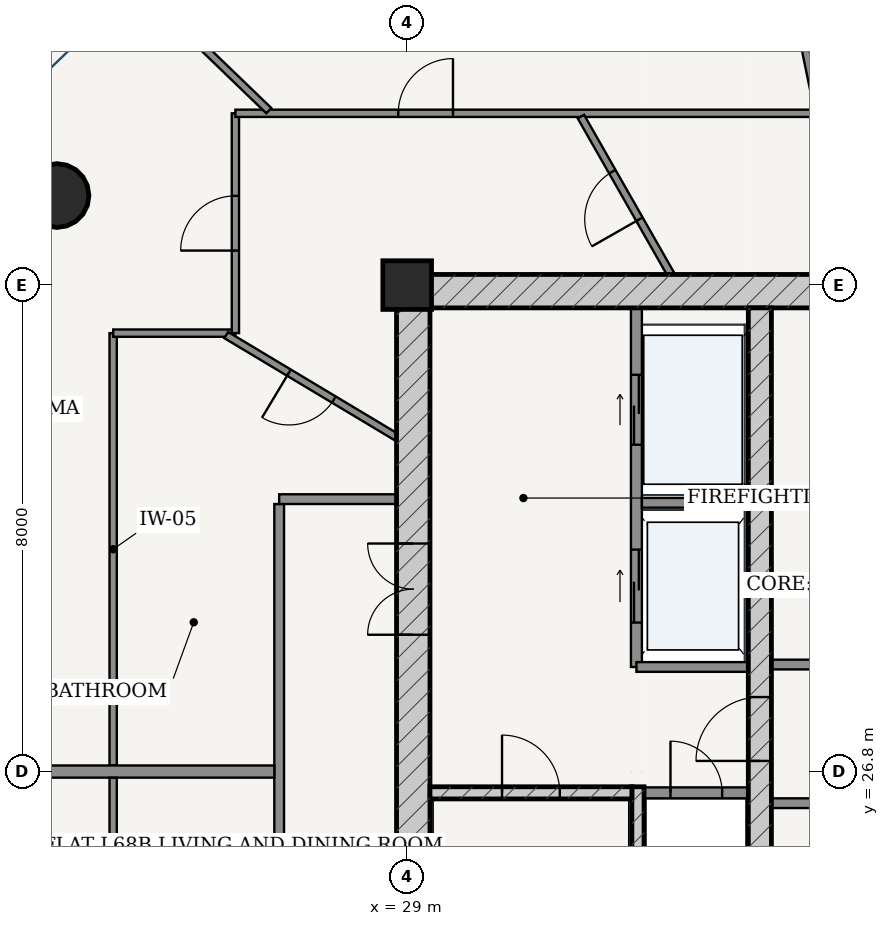
"""IFC4 building model, lengths in metres.
Left out: names, types, materials, properties, quantities, classifications, styles, units other than length and angle.
Written with IfcOpenShell. Run it as: python <this file> out.ifc"""

import sys

from ifc_helpers import new_model, si_unit, direction, frame, frame_2d, origin, origin_2d, place, context, subcontext, project, spatial, rectangle, hollow_circle, extrude, source, transform, mapped, element, fill, save


model = new_model("IFC4")
c1 = context("Model", 3, precision=1e-05, world=origin(), true_north=direction((-0.2419218956, 0.970295726276)))
c2 = subcontext(c1, "Body", "Model", "MODEL_VIEW")
j1 = project(units=[si_unit("LENGTHUNIT", "METRE"), si_unit("PLANEANGLEUNIT", "RADIAN")], contexts=[c1])
p1 = place(None, origin())
s1 = spatial("IfcSite", under=j1, at=p1, CompositionType="ELEMENT")
p2 = place(p1, origin())
s2 = spatial("IfcBuilding", under=s1, at=p2, CompositionType="ELEMENT")
p3 = place(p2, frame((0.0, 0.0, 259.45)))
s3 = spatial("IfcBuildingStorey", under=s2, at=p3, CompositionType="ELEMENT", Elevation=259.45)
p4 = place(p3, frame((29.0, 34.8, 0.0), z_axis=(0.0, 0.0, 1.0), x_axis=(1.0, 0.0, 0.0)))
e1 = element("IfcColumn", 1, at=p4, inside=s3, PredefinedType="COLUMN", context=c2, shape_type="SweptSolid", body=[
    extrude(rectangle(XDim=0.8, YDim=0.8, at=origin_2d()), origin(), (0.0, 0.0, 1.0), 3.75),
])
p5 = place(p3, frame((28.825, 34.7, 0.0), z_axis=(0.0, 0.0, 1.0), x_axis=(1.0, 0.0, 0.0)))
e2 = element("IfcWall", 2, at=p5, inside=s3, PredefinedType="SHEAR", context=c2, shape_type="SweptSolid", body=[
    extrude(rectangle(XDim=18.35, YDim=0.55, at=frame_2d((9.175, 0.0))), origin(), (0.0, 0.0, 1.0), 3.49),
])
p6 = place(p3, frame((29.1, 19.175, 0.0), z_axis=(0.0, 0.0, 1.0), x_axis=(0.0, 1.0, 0.0)))
e3 = element("IfcWall", 3, at=p6, inside=s3, PredefinedType="SHEAR", context=c2, shape_type="SweptSolid", body=[
    extrude(rectangle(XDim=15.25, YDim=0.55, at=frame_2d((7.625, 0.0))), origin(), (0.0, 0.0, 1.0), 3.49),
])
p7 = place(p6, frame((9.875, 0.0, 0.0)))
e4 = element("IfcOpeningElement", 4, at=p7, cuts=e3, PredefinedType="OPENING", context=c2, shape_type="SweptSolid", body=[
    extrude(rectangle(XDim=1.5, YDim=2.2, at=frame_2d((0.75, 1.1))), frame((0.0, 0.285, 0.0), z_axis=(0.0, -1.0, 0.0), x_axis=(1.0, 0.0, 0.0)), (0.0, 0.0, 1.0), 0.57),
])
p8 = place(p3, frame((32.795, 19.175, 0.0), z_axis=(0.0, 0.0, 1.0), x_axis=(0.0, 1.0, 0.0)))
e5 = element("IfcWall", 5, at=p8, inside=s3, PredefinedType="SOLIDWALL", context=c2, shape_type="SweptSolid", body=[
    extrude(rectangle(XDim=7.375, YDim=0.2, at=frame_2d((3.688, 0.0))), origin(), (0.0, 0.0, 1.0), 3.49),
])
p9 = place(p3, frame((29.375, 26.45, 0.0), z_axis=(0.0, 0.0, 1.0), x_axis=(1.0, 0.0, 0.0)))
e6 = element("IfcWall", 6, at=p9, inside=s3, PredefinedType="SOLIDWALL", context=c2, shape_type="SweptSolid", body=[
    extrude(rectangle(XDim=3.32, YDim=0.2, at=frame_2d((1.66, 0.0))), origin(), (0.0, 0.0, 1.0), 3.49),
])
p10 = place(p9, frame((1.185, 0.0, 0.0)))
e7 = element("IfcOpeningElement", 7, at=p10, cuts=e6, PredefinedType="OPENING", context=c2, shape_type="SweptSolid", body=[
    extrude(rectangle(XDim=0.95, YDim=2.15, at=frame_2d((0.475, 1.075))), frame((0.0, 0.11, 0.0), z_axis=(0.0, -1.0, 0.0), x_axis=(1.0, 0.0, 0.0)), (0.0, 0.0, 1.0), 0.22),
])
p11 = place(p3, frame((34.8, 19.175, 0.0), z_axis=(0.0, 0.0, 1.0), x_axis=(0.0, 1.0, 0.0)))
e8 = element("IfcWall", 8, at=p11, inside=s3, PredefinedType="SHEAR", context=c2, shape_type="SweptSolid", body=[
    extrude(rectangle(XDim=15.25, YDim=0.38, at=frame_2d((7.625, 0.0))), origin(), (0.0, 0.0, 1.0), 3.49),
])
p12 = place(p11, frame((7.8, 0.0, 0.0)))
e9 = element("IfcOpeningElement", 9, at=p12, cuts=e8, PredefinedType="OPENING", context=c2, shape_type="SweptSolid", body=[
    extrude(rectangle(XDim=1.05, YDim=2.15, at=frame_2d((0.525, 1.075))), frame((0.0, 0.2, 0.0), z_axis=(0.0, -1.0, 0.0), x_axis=(1.0, 0.0, 0.0)), (0.0, 0.0, 1.0), 0.4),
])
p13 = place(p3, frame((23.241, 36.272, 0.0), z_axis=(0.0, 0.0, 1.0), x_axis=(1.0, 0.0, 0.0)))
e10 = element("IfcColumn", 10, at=p13, inside=s3, PredefinedType="COLUMN", context=c2, shape_type="SweptSolid", body=[
    extrude(hollow_circle(Radius=0.525, WallThickness=0.035, at=origin_2d()), origin(), (0.0, 0.0, 1.0), 3.75),
])
p14 = place(p3, frame((32.9, 26.45, 0.0), z_axis=(0.0, 0.0, 1.0), x_axis=(1.0, 0.0, 0.0)))
e11 = element("IfcWall", 11, at=p14, inside=s3, PredefinedType="PARTITIONING", context=c2, shape_type="SweptSolid", body=[
    extrude(rectangle(XDim=1.71, YDim=0.18, at=frame_2d((0.855, 0.0))), origin(), (0.0, 0.0, 1.0), 3.49),
])
p15 = place(p14, frame((0.43, 0.0, 0.0)))
e12 = element("IfcOpeningElement", 12, at=p15, cuts=e11, PredefinedType="OPENING", context=c2, shape_type="SweptSolid", body=[
    extrude(rectangle(XDim=0.85, YDim=2.1, at=frame_2d((0.425, 1.05))), frame((0.0, 0.1, 0.0), z_axis=(0.0, -1.0, 0.0), x_axis=(1.0, 0.0, 0.0)), (0.0, 0.0, 1.0), 0.2),
])
p16 = place(p3, frame((32.77, 28.52, 0.0), z_axis=(0.0, 0.0, 1.0), x_axis=(0.0, 1.0, 0.0)))
e13 = element("IfcWall", 13, at=p16, inside=s3, PredefinedType="PARTITIONING", context=c2, shape_type="SweptSolid", body=[
    extrude(rectangle(XDim=5.905, YDim=0.18, at=frame_2d((2.953, 0.0))), origin(), (0.0, 0.0, 1.0), 3.49),
])
p17 = place(p16, frame((3.655, 0.0, 0.0)))
e14 = element("IfcOpeningElement", 14, at=p17, cuts=e13, PredefinedType="OPENING", context=c2, shape_type="SweptSolid", body=[
    extrude(rectangle(XDim=1.15, YDim=2.2, at=frame_2d((0.575, 1.1))), frame((0.0, 0.1, 0.0), z_axis=(0.0, -1.0, 0.0), x_axis=(1.0, 0.0, 0.0)), (0.0, 0.0, 1.0), 0.2),
])
p18 = place(p16, frame((0.73, 0.0, 0.0)))
e15 = element("IfcOpeningElement", 15, at=p18, cuts=e13, PredefinedType="OPENING", context=c2, shape_type="SweptSolid", body=[
    extrude(rectangle(XDim=1.2, YDim=2.25, at=frame_2d((0.6, 1.125))), frame((0.0, 0.1, 0.0), z_axis=(0.0, -1.0, 0.0), x_axis=(1.0, 0.0, 0.0)), (0.0, 0.0, 1.0), 0.2),
])
p19 = place(p3, frame((32.86, 31.22, 0.0), z_axis=(0.0, 0.0, 1.0), x_axis=(1.0, 0.0, 0.0)))
e16 = element("IfcWall", 16, at=p19, inside=s3, PredefinedType="PARTITIONING", context=c2, shape_type="SweptSolid", body=[
    extrude(rectangle(XDim=1.75, YDim=0.16, at=frame_2d((0.875, 0.0))), origin(), (0.0, 0.0, 1.0), 3.49),
])
p20 = place(p3, frame((32.77, 28.52, 0.0), z_axis=(0.0, 0.0, 1.0), x_axis=(1.0, 0.0, 0.0)))
e17 = element("IfcWall", 17, at=p20, inside=s3, PredefinedType="PARTITIONING", context=c2, shape_type="SweptSolid", body=[
    extrude(rectangle(XDim=1.84, YDim=0.16, at=frame_2d((0.92, 0.0))), origin(), (0.0, 0.0, 1.0), 3.49),
])
p21 = place(p3, frame((34.99, 28.56, 0.0), z_axis=(0.0, 0.0, 1.0), x_axis=(1.0, 0.0, 0.0)))
e18 = element("IfcWall", 18, at=p21, inside=s3, PredefinedType="PARTITIONING", context=c2, shape_type="SweptSolid", body=[
    extrude(rectangle(XDim=6.02, YDim=0.16, at=frame_2d((3.01, 0.0))), origin(), (0.0, 0.0, 1.0), 3.49),
])
p22 = place(p21, frame((2.585, 0.0, 0.0)))
e19 = element("IfcOpeningElement", 19, at=p22, cuts=e18, PredefinedType="OPENING", context=c2, shape_type="SweptSolid", body=[
    extrude(rectangle(XDim=0.85, YDim=2.1, at=frame_2d((0.425, 1.05))), frame((0.0, 0.09, 0.0), z_axis=(0.0, -1.0, 0.0), x_axis=(1.0, 0.0, 0.0)), (0.0, 0.0, 1.0), 0.18),
])
p23 = place(p3, frame((34.99, 26.28, 0.0), z_axis=(0.0, 0.0, 1.0), x_axis=(1.0, 0.0, 0.0)))
e20 = element("IfcWall", 20, at=p23, inside=s3, PredefinedType="PARTITIONING", context=c2, shape_type="SweptSolid", body=[
    extrude(rectangle(XDim=6.02, YDim=0.16, at=frame_2d((3.01, 0.0))), origin(), (0.0, 0.0, 1.0), 3.49),
])
p24 = place(p23, frame((1.045, 0.0, 0.0)))
e21 = element("IfcOpeningElement", 21, at=p24, cuts=e20, PredefinedType="OPENING", context=c2, shape_type="SweptSolid", body=[
    extrude(rectangle(XDim=0.85, YDim=2.1, at=frame_2d((0.425, 1.05))), frame((0.0, 0.09, 0.0), z_axis=(0.0, -1.0, 0.0), x_axis=(1.0, 0.0, 0.0)), (0.0, 0.0, 1.0), 0.18),
])
p25 = place(p23, frame((3.215, 0.0, 0.0)))
e22 = element("IfcOpeningElement", 22, at=p25, cuts=e20, PredefinedType="OPENING", context=c2, shape_type="SweptSolid", body=[
    extrude(rectangle(XDim=1.1, YDim=2.2, at=frame_2d((0.55, 1.1))), frame((0.0, 0.09, 0.0), z_axis=(0.0, -1.0, 0.0), x_axis=(1.0, 0.0, 0.0)), (0.0, 0.0, 1.0), 0.18),
])
p26 = place(p23, frame((4.695, 0.0, 0.0)))
e23 = element("IfcOpeningElement", 23, at=p26, cuts=e20, PredefinedType="OPENING", context=c2, shape_type="SweptSolid", body=[
    extrude(rectangle(XDim=1.1, YDim=2.2, at=frame_2d((0.55, 1.1))), frame((0.0, 0.09, 0.0), z_axis=(0.0, -1.0, 0.0), x_axis=(1.0, 0.0, 0.0)), (0.0, 0.0, 1.0), 0.18),
])
p27 = place(p3, frame((26.895, 17.275, 0.0), z_axis=(0.0, 0.0, 1.0), x_axis=(0.0, 1.0, 0.0)))
e24 = element("IfcWall", 24, at=p27, inside=s3, PredefinedType="PARTITIONING", context=c2, shape_type="SweptSolid", body=[
    extrude(rectangle(XDim=13.925, YDim=0.16, at=frame_2d((6.962, 0.0))), origin(), (0.0, 0.0, 1.0), 3.015),
])
p28 = place(p27, frame((1.992, 0.0, 0.0)))
e25 = element("IfcOpeningElement", 25, at=p28, cuts=e24, PredefinedType="OPENING", context=c2, shape_type="SweptSolid", body=[
    extrude(rectangle(XDim=0.98, YDim=2.2, at=frame_2d((0.49, 1.1))), frame((0.0, 0.09, 0.0), z_axis=(0.0, -1.0, 0.0), x_axis=(1.0, 0.0, 0.0)), (0.0, 0.0, 1.0), 0.18),
])
p29 = place(p3, frame((26.895, 31.28, 0.0), z_axis=(0.0, 0.0, 1.0), x_axis=(1.0, 0.0, 0.0)))
e26 = element("IfcWall", 26, at=p29, inside=s3, PredefinedType="PARTITIONING", context=c2, shape_type="SweptSolid", body=[
    extrude(rectangle(XDim=1.93, YDim=0.16, at=frame_2d((0.965, 0.0))), origin(), (0.0, 0.0, 1.0), 3.49),
])
p30 = place(p3, frame((24.165, 26.902, 0.0), z_axis=(0.0, 0.0, 1.0), x_axis=(0.0, 1.0, 0.0)))
e27 = element("IfcWall", 27, at=p30, inside=s3, PredefinedType="PARTITIONING", context=c2, shape_type="SweptSolid", body=[
    extrude(rectangle(XDim=7.108, YDim=0.12, at=frame_2d((3.554, 0.0))), origin(), (0.0, 0.0, 1.0), 3.015),
])
p31 = place(p3, frame((24.165, 34.01, 0.0), z_axis=(0.0, 0.0, 1.0), x_axis=(1.0, 0.0, 0.0)))
e28 = element("IfcWall", 28, at=p31, inside=s3, PredefinedType="PARTITIONING", context=c2, shape_type="SweptSolid", body=[
    extrude(rectangle(XDim=2.01, YDim=0.12, at=frame_2d((1.005, 0.0))), origin(), (0.0, 0.0, 1.0), 3.209),
])
p32 = place(p3, frame((26.175, 34.01, 0.0), z_axis=(0.0, 0.0, 1.0), x_axis=(0.0, 1.0, 0.0)))
e29 = element("IfcWall", 29, at=p32, inside=s3, PredefinedType="PARTITIONING", context=c2, shape_type="SweptSolid", body=[
    extrude(rectangle(XDim=3.615, YDim=0.12, at=frame_2d((1.808, 0.0))), origin(), (0.0, 0.0, 1.0), 3.015),
])
p33 = place(p32, frame((1.357, 0.0, 0.0)))
e30 = element("IfcOpeningElement", 30, at=p33, cuts=e29, PredefinedType="OPENING", context=c2, shape_type="SweptSolid", body=[
    extrude(rectangle(XDim=0.9, YDim=2.15, at=frame_2d((0.45, 1.075))), frame((0.0, 0.07, 0.0), z_axis=(0.0, -1.0, 0.0), x_axis=(1.0, 0.0, 0.0)), (0.0, 0.0, 1.0), 0.14),
])
p34 = place(p3, frame((26.175, 37.625, 0.0), z_axis=(0.0, 0.0, 1.0), x_axis=(1.0, 0.0, 0.0)))
e31 = element("IfcWall", 31, at=p34, inside=s3, PredefinedType="PARTITIONING", context=c2, shape_type="SweptSolid", body=[
    extrude(rectangle(XDim=23.65, YDim=0.12, at=frame_2d((11.825, 0.0))), origin(), (0.0, 0.0, 1.0), 3.015),
])
p35 = place(p34, frame((14.733, 0.0, 0.0)))
e32 = element("IfcOpeningElement", 32, at=p35, cuts=e31, PredefinedType="OPENING", context=c2, shape_type="SweptSolid", body=[
    extrude(rectangle(XDim=0.9, YDim=2.15, at=frame_2d((0.45, 1.075))), frame((0.0, 0.07, 0.0), z_axis=(0.0, -1.0, 0.0), x_axis=(1.0, 0.0, 0.0)), (0.0, 0.0, 1.0), 0.14),
])
p36 = place(p34, frame((11.279, 0.0, 0.0)))
e33 = element("IfcOpeningElement", 33, at=p36, cuts=e31, PredefinedType="OPENING", context=c2, shape_type="SweptSolid", body=[
    extrude(rectangle(XDim=0.9, YDim=2.15, at=frame_2d((0.45, 1.075))), frame((0.0, 0.07, 0.0), z_axis=(0.0, -1.0, 0.0), x_axis=(1.0, 0.0, 0.0)), (0.0, 0.0, 1.0), 0.14),
])
p37 = place(p34, frame((2.678, 0.0, 0.0)))
e34 = element("IfcOpeningElement", 34, at=p37, cuts=e31, PredefinedType="OPENING", context=c2, shape_type="SweptSolid", body=[
    extrude(rectangle(XDim=0.9, YDim=2.15, at=frame_2d((0.45, 1.075))), frame((0.0, 0.07, 0.0), z_axis=(0.0, -1.0, 0.0), x_axis=(1.0, 0.0, 0.0)), (0.0, 0.0, 1.0), 0.14),
])
p38 = place(p3, frame((35.754, 37.686, 0.0), z_axis=(0.0, 0.0, 1.0), x_axis=(-0.202105877204, 0.979363678313, 0.0)))
e35 = element("IfcWall", 35, at=p38, inside=s3, PredefinedType="PARTITIONING", context=c2, shape_type="SweptSolid", body=[
    extrude(rectangle(XDim=7.512, YDim=0.12, at=frame_2d((3.756, 0.0))), origin(), (0.0, 0.0, 1.0), 3.015),
])
p39 = place(p3, frame((26.725, 37.668, 0.0), z_axis=(0.0, 0.0, 1.0), x_axis=(-0.719954096891, 0.694021684366, 0.0)))
e36 = element("IfcWall", 36, at=p39, inside=s3, PredefinedType="PARTITIONING", context=c2, shape_type="SweptSolid", body=[
    extrude(rectangle(XDim=3.333, YDim=0.12, at=frame_2d((1.667, 0.0))), origin(), (0.0, 0.0, 1.0), 3.121),
])
p40 = place(p3, frame((33.336, 34.977, 0.0), z_axis=(0.0, 0.0, 1.0), x_axis=(-0.495399243909, 0.868665406894, 0.0)))
e37 = element("IfcWall", 37, at=p40, inside=s3, PredefinedType="PARTITIONING", context=c2, shape_type="SweptSolid", body=[
    extrude(rectangle(XDim=2.987, YDim=0.12, at=frame_2d((1.493, 0.0))), origin(), (0.0, 0.0, 1.0), 3.49),
])
p41 = place(p40, frame((1.043, 0.0, 0.0)))
e38 = element("IfcOpeningElement", 38, at=p41, cuts=e37, PredefinedType="OPENING", context=c2, shape_type="SweptSolid", body=[
    extrude(rectangle(XDim=0.9, YDim=2.15, at=frame_2d((0.45, 1.075))), frame((0.0, 0.07, 0.0), z_axis=(0.0, -1.0, 0.0), x_axis=(1.0, 0.0, 0.0)), (0.0, 0.0, 1.0), 0.14),
])
p42 = place(p3, frame((28.825, 32.3, 0.0), z_axis=(0.0, 0.0, 1.0), x_axis=(-0.857743539935, 0.514077834282, 0.0)))
e39 = element("IfcWall", 39, at=p42, inside=s3, PredefinedType="PARTITIONING", context=c2, shape_type="SweptSolid", body=[
    extrude(rectangle(XDim=3.265, YDim=0.12, at=frame_2d((1.632, 0.0))), origin(), (0.0, 0.0, 1.0), 3.49),
])
p43 = place(p42, frame((1.202, 0.0, 0.0)))
e40 = element("IfcOpeningElement", 40, at=p43, cuts=e39, PredefinedType="OPENING", context=c2, shape_type="SweptSolid", body=[
    extrude(rectangle(XDim=0.86, YDim=2.15, at=frame_2d((0.43, 1.075))), frame((0.0, 0.07, 0.0), z_axis=(0.0, -1.0, 0.0), x_axis=(1.0, 0.0, 0.0)), (0.0, 0.0, 1.0), 0.14),
])
p44 = place(p3, frame((26.815, 26.8, 0.0), z_axis=(0.0, 0.0, 1.0), x_axis=(-1.0, 0.0, 0.0)))
e41 = element("IfcWall", 41, at=p44, inside=s3, PredefinedType="PARTITIONING", context=c2, shape_type="SweptSolid", body=[
    extrude(rectangle(XDim=8.155, YDim=0.2, at=frame_2d((4.078, 0.0))), origin(), (0.0, 0.0, 1.0), 3.121),
])
p45 = place(p3, frame((24.165, 14.465, 0.0), z_axis=(0.0, 0.0, 1.0), x_axis=(0.0, 1.0, 0.0)))
e42 = element("IfcWall", 42, at=p45, inside=s3, PredefinedType="PARTITIONING", context=c2, shape_type="SweptSolid", body=[
    extrude(rectangle(XDim=12.233, YDim=0.12, at=frame_2d((6.116, 0.0))), origin(), (0.0, 0.0, 1.0), 3.015),
])
p46 = place(p45, frame((3.863, 0.0, 0.0)))
e43 = element("IfcOpeningElement", 43, at=p46, cuts=e42, PredefinedType="OPENING", context=c2, shape_type="SweptSolid", body=[
    extrude(rectangle(XDim=0.9, YDim=2.15, at=frame_2d((0.45, 1.075))), frame((0.0, 0.07, 0.0), z_axis=(0.0, -1.0, 0.0), x_axis=(1.0, 0.0, 0.0)), (0.0, 0.0, 1.0), 0.14),
])
m1 = source(origin(), c2, "Body", "SweptSolid", [
    extrude(rectangle(XDim=1.5, YDim=2.2, at=frame_2d((0.75, 1.1))), frame((0.0, 0.025, 0.0), z_axis=(0.0, -1.0, 0.0), x_axis=(1.0, 0.0, 0.0)), (0.0, 0.0, 1.0), 0.05),
])
p47 = place(p7, origin())
e44 = element("IfcDoor", 44, at=p47, inside=s3, OperationType="DOUBLE_DOOR_SINGLE_SWING", PredefinedType="DOOR", context=c2, shape_type="MappedRepresentation", body=[
    mapped(m1, transform((0.0, 0.0, 0.0), scale=1.0)),
])
fill(e4, e44)
m2 = source(origin(), c2, "Body", "SweptSolid", [
    extrude(rectangle(XDim=1.05, YDim=2.15, at=frame_2d((0.525, 1.075))), frame((0.0, 0.025, 0.0), z_axis=(0.0, -1.0, 0.0), x_axis=(1.0, 0.0, 0.0)), (0.0, 0.0, 1.0), 0.05),
])
p48 = place(p12, origin())
e45 = element("IfcDoor", 45, at=p48, inside=s3, OperationType="SINGLE_SWING_LEFT", PredefinedType="DOOR", context=c2, shape_type="MappedRepresentation", body=[
    mapped(m2, transform((0.0, 0.0, 0.0), scale=1.0)),
])
fill(e9, e45)
m3 = source(origin(), c2, "Body", "SweptSolid", [
    extrude(rectangle(XDim=0.95, YDim=2.15, at=frame_2d((0.475, 1.075))), frame((0.0, 0.025, 0.0), z_axis=(0.0, -1.0, 0.0), x_axis=(1.0, 0.0, 0.0)), (0.0, 0.0, 1.0), 0.05),
])
p49 = place(p10, origin())
e46 = element("IfcDoor", 46, at=p49, inside=s3, OperationType="SINGLE_SWING_LEFT", PredefinedType="DOOR", context=c2, shape_type="MappedRepresentation", body=[
    mapped(m3, transform((0.0, 0.0, 0.0), scale=1.0)),
])
fill(e7, e46)
m4 = source(origin(), c2, "Body", "SweptSolid", [
    extrude(rectangle(XDim=0.85, YDim=2.1, at=frame_2d((0.425, 1.05))), frame((0.0, 0.025, 0.0), z_axis=(0.0, -1.0, 0.0), x_axis=(1.0, 0.0, 0.0)), (0.0, 0.0, 1.0), 0.05),
])
p50 = place(p15, origin())
e47 = element("IfcDoor", 47, at=p50, inside=s3, OperationType="SINGLE_SWING_LEFT", PredefinedType="DOOR", context=c2, shape_type="MappedRepresentation", body=[
    mapped(m4, transform((0.0, 0.0, 0.0), scale=1.0)),
])
fill(e12, e47)
m5 = source(origin(), c2, "Body", "SweptSolid", [
    extrude(rectangle(XDim=1.15, YDim=2.2, at=frame_2d((0.575, 1.1))), frame((0.0, 0.025, 0.0), z_axis=(0.0, -1.0, 0.0), x_axis=(1.0, 0.0, 0.0)), (0.0, 0.0, 1.0), 0.05),
])
p51 = place(p17, origin())
e48 = element("IfcDoor", 48, at=p51, inside=s3, OperationType="DOUBLE_DOOR_SLIDING", PredefinedType="DOOR", context=c2, shape_type="MappedRepresentation", body=[
    mapped(m5, transform((0.0, 0.0, 0.0), scale=1.0)),
])
fill(e14, e48)
m6 = source(origin(), c2, "Body", "SweptSolid", [
    extrude(rectangle(XDim=1.2, YDim=2.25, at=frame_2d((0.6, 1.125))), frame((0.0, 0.025, 0.0), z_axis=(0.0, -1.0, 0.0), x_axis=(1.0, 0.0, 0.0)), (0.0, 0.0, 1.0), 0.05),
])
p52 = place(p18, origin())
e49 = element("IfcDoor", 49, at=p52, inside=s3, OperationType="DOUBLE_DOOR_SLIDING", PredefinedType="DOOR", context=c2, shape_type="MappedRepresentation", body=[
    mapped(m6, transform((0.0, 0.0, 0.0), scale=1.0)),
])
fill(e15, e49)
m7 = source(origin(), c2, "Body", "SweptSolid", [
    extrude(rectangle(XDim=0.9, YDim=2.15, at=frame_2d((0.45, 1.075))), frame((0.0, 0.025, 0.0), z_axis=(0.0, -1.0, 0.0), x_axis=(1.0, 0.0, 0.0)), (0.0, 0.0, 1.0), 0.05),
])
p53 = place(p41, origin())
e50 = element("IfcDoor", 50, at=p53, inside=s3, OperationType="SINGLE_SWING_LEFT", PredefinedType="DOOR", context=c2, shape_type="MappedRepresentation", body=[
    mapped(m7, transform((0.0, 0.0, 0.0), scale=1.0)),
])
fill(e38, e50)
m8 = source(origin(), c2, "Body", "SweptSolid", [
    extrude(rectangle(XDim=0.86, YDim=2.15, at=frame_2d((0.43, 1.075))), frame((0.0, 0.025, 0.0), z_axis=(0.0, -1.0, 0.0), x_axis=(1.0, 0.0, 0.0)), (0.0, 0.0, 1.0), 0.05),
])
p54 = place(p43, origin())
e51 = element("IfcDoor", 51, at=p54, inside=s3, OperationType="SINGLE_SWING_RIGHT", PredefinedType="DOOR", context=c2, shape_type="MappedRepresentation", body=[
    mapped(m8, transform((0.0, 0.0, 0.0), scale=1.0)),
])
fill(e40, e51)
p55 = place(p37, origin())
e52 = element("IfcDoor", 52, at=p55, inside=s3, OperationType="SINGLE_SWING_RIGHT", PredefinedType="DOOR", context=c2, shape_type="MappedRepresentation", body=[
    mapped(m7, transform((0.0, 0.0, 0.0), scale=1.0)),
])
fill(e34, e52)
p56 = place(p33, origin())
e53 = element("IfcDoor", 53, at=p56, inside=s3, OperationType="SINGLE_SWING_LEFT", PredefinedType="DOOR", context=c2, shape_type="MappedRepresentation", body=[
    mapped(m7, transform((0.0, 0.0, 0.0), scale=1.0)),
])
fill(e30, e53)
save(model, sys.argv[1])
